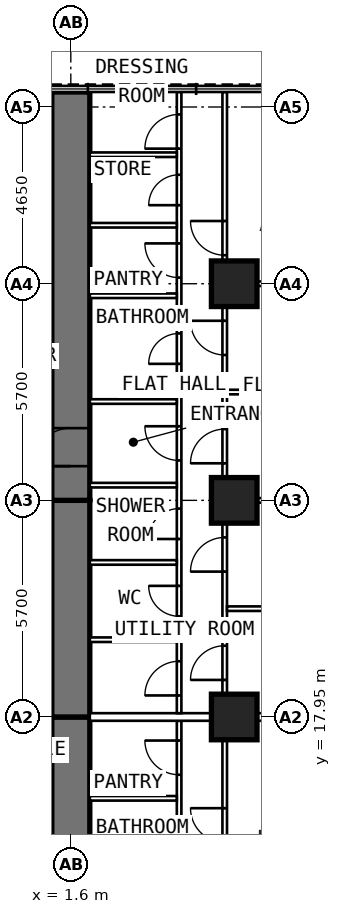
"""IFC4 building model, lengths in metres.
Left out: names, types, materials, properties, quantities, classifications, styles, units other than length and angle.
Written with IfcOpenShell. Run it as: python <this file> out.ifc"""

import sys

from ifc_helpers import new_model, si_unit, direction, frame, frame_2d, origin, origin_2d, place, context, subcontext, project, spatial, rectangle, extrude, element, fill, save


model = new_model("IFC4")
c1 = context("Model", 3, precision=1e-05, world=origin(), true_north=direction((0.0, 1.0)))
c2 = subcontext(c1, "Body", "Model", "MODEL_VIEW")
j1 = project(units=[si_unit("LENGTHUNIT", "METRE"), si_unit("PLANEANGLEUNIT", "RADIAN")], contexts=[c1])
p1 = place(None, origin())
s1 = spatial("IfcSite", under=j1, at=p1, CompositionType="ELEMENT")
p2 = place(p1, origin())
s2 = spatial("IfcBuilding", under=s1, at=p2, CompositionType="ELEMENT")
p3 = place(p2, frame((0.0, 0.0, 46.6)))
s3 = spatial("IfcBuildingStorey", under=s2, at=p3, CompositionType="ELEMENT", Elevation=46.6)
for number, where, z_axis, x_axis in (
    (1, (5.9, 17.95, 0.0), (0.0, 0.0, 1.0), (0.0, 1.0, 0.0)),
    (2, (5.9, 23.65, 0.0), (0.0, 0.0, 1.0), (0.0, 1.0, 0.0)),
    (3, (5.9, 29.35, 0.0), (0.0, 0.0, 1.0), (0.0, 1.0, 0.0)),
):
    element("IfcColumn", number, at=place(p3, frame(where, z_axis=z_axis, x_axis=x_axis)), inside=s3, PredefinedType="COLUMN", context=c2, shape_type="SweptSolid", body=[
        extrude(rectangle(XDim=1.2, YDim=1.2, at=origin_2d()), origin(), (0.0, 0.0, 1.0), 3.6),
    ])
p4 = place(p3, frame((1.6, 9.6, 0.0), z_axis=(0.0, 0.0, 1.0), x_axis=(0.0, 1.0, 0.0)))
e4 = element("IfcWall", 4, at=p4, inside=s3, PredefinedType="SHEAR", context=c2, shape_type="SweptSolid", body=[
    extrude(rectangle(XDim=8.35, YDim=1.0, at=frame_2d((4.175, 0.0))), origin(), (0.0, 0.0, 1.0), 3.6),
])
p5 = place(p4, frame((1.3, 0.0, 0.0)))
e5 = element("IfcOpeningElement", 5, at=p5, cuts=e4, PredefinedType="OPENING", context=c2, shape_type="SweptSolid", body=[
    extrude(rectangle(XDim=1.0, YDim=2.1, at=frame_2d((0.5, 1.05))), frame((0.0, 0.512, 0.0), z_axis=(0.0, -1.0, 0.0), x_axis=(1.0, 0.0, 0.0)), (0.0, 0.0, 1.0), 1.024),
])
p6 = place(p3, frame((1.6, 17.95, 0.0), z_axis=(0.0, 0.0, 1.0), x_axis=(0.0, 1.0, 0.0)))
e6 = element("IfcWall", 6, at=p6, inside=s3, PredefinedType="SHEAR", context=c2, shape_type="SweptSolid", body=[
    extrude(rectangle(XDim=5.7, YDim=1.0, at=frame_2d((2.85, 0.0))), origin(), (0.0, 0.0, 1.0), 3.6),
])
p7 = place(p3, frame((1.6, 23.65, 0.0), z_axis=(0.0, 0.0, 1.0), x_axis=(0.0, 1.0, 0.0)))
e7 = element("IfcWall", 7, at=p7, inside=s3, PredefinedType="SHEAR", context=c2, shape_type="SweptSolid", body=[
    extrude(rectangle(XDim=10.745, YDim=1.0, at=frame_2d((5.373, 0.0))), origin(), (0.0, 0.0, 1.0), 3.6),
])
p8 = place(p7, frame((0.9, 0.0, 0.0)))
e8 = element("IfcOpeningElement", 8, at=p8, cuts=e7, PredefinedType="OPENING", context=c2, shape_type="SweptSolid", body=[
    extrude(rectangle(XDim=1.0, YDim=2.1, at=frame_2d((0.5, 1.05))), frame((0.0, 0.512, 0.0), z_axis=(0.0, -1.0, 0.0), x_axis=(1.0, 0.0, 0.0)), (0.0, 0.0, 1.0), 1.024),
])
p9 = place(p3, frame((4.45, 10.1, 0.0), z_axis=(0.0, 0.0, 1.0), x_axis=(0.0, 1.0, 0.0)))
e9 = element("IfcWall", 9, at=p9, inside=s3, PredefinedType="PARTITIONING", context=c2, shape_type="SweptSolid", body=[
    extrude(rectangle(XDim=7.75, YDim=0.12, at=frame_2d((3.875, 0.0))), origin(), (0.0, 0.0, 1.0), 3.35),
])
p10 = place(p9, frame((0.75, 0.0, 0.0)))
e10 = element("IfcOpeningElement", 10, at=p10, cuts=e9, PredefinedType="OPENING", context=c2, shape_type="SweptSolid", body=[
    extrude(rectangle(XDim=0.9, YDim=2.1, at=frame_2d((0.45, 1.05))), frame((0.0, 0.072, 0.0), z_axis=(0.0, -1.0, 0.0), x_axis=(1.0, 0.0, 0.0)), (0.0, 0.0, 1.0), 0.144),
])
p11 = place(p9, frame((3.705, 0.0, 0.0)))
e11 = element("IfcOpeningElement", 11, at=p11, cuts=e9, PredefinedType="OPENING", context=c2, shape_type="SweptSolid", body=[
    extrude(rectangle(XDim=0.8, YDim=2.1, at=frame_2d((0.4, 1.05))), frame((0.0, 0.072, 0.0), z_axis=(0.0, -1.0, 0.0), x_axis=(1.0, 0.0, 0.0)), (0.0, 0.0, 1.0), 0.144),
])
p12 = place(p9, frame((6.33, 0.0, 0.0)))
e12 = element("IfcOpeningElement", 12, at=p12, cuts=e9, PredefinedType="OPENING", context=c2, shape_type="SweptSolid", body=[
    extrude(rectangle(XDim=0.9, YDim=2.1, at=frame_2d((0.45, 1.05))), frame((0.0, 0.072, 0.0), z_axis=(0.0, -1.0, 0.0), x_axis=(1.0, 0.0, 0.0)), (0.0, 0.0, 1.0), 0.144),
])
p13 = place(p3, frame((5.65, 9.6, 0.0), z_axis=(0.0, 0.0, 1.0), x_axis=(0.0, 1.0, 0.0)))
e13 = element("IfcWall", 13, at=p13, inside=s3, PredefinedType="PARTITIONING", context=c2, shape_type="SweptSolid", body=[
    extrude(rectangle(XDim=8.1, YDim=0.12, at=frame_2d((4.05, 0.0))), origin(), (0.0, 0.0, 1.0), 3.35),
])
p14 = place(p13, frame((5.05, 0.0, 0.0)))
e14 = element("IfcOpeningElement", 14, at=p14, cuts=e13, PredefinedType="OPENING", context=c2, shape_type="SweptSolid", body=[
    extrude(rectangle(XDim=0.9, YDim=2.1, at=frame_2d((0.45, 1.05))), frame((0.0, 0.072, 0.0), z_axis=(0.0, -1.0, 0.0), x_axis=(1.0, 0.0, 0.0)), (0.0, 0.0, 1.0), 0.144),
])
p15 = place(p3, frame((2.1, 15.81, 0.0), z_axis=(0.0, 0.0, 1.0), x_axis=(1.0, 0.0, 0.0)))
e15 = element("IfcWall", 15, at=p15, inside=s3, PredefinedType="PARTITIONING", context=c2, shape_type="SweptSolid", body=[
    extrude(rectangle(XDim=2.29, YDim=0.12, at=frame_2d((1.145, 0.0))), origin(), (0.0, 0.0, 1.0), 3.35),
])
p16 = place(p3, frame((4.45, 18.05, 0.0), z_axis=(0.0, 0.0, 1.0), x_axis=(0.0, 1.0, 0.0)))
e16 = element("IfcWall", 16, at=p16, inside=s3, PredefinedType="PARTITIONING", context=c2, shape_type="SweptSolid", body=[
    extrude(rectangle(XDim=16.345, YDim=0.12, at=frame_2d((8.172, 0.0))), origin(), (0.0, 0.0, 1.0), 3.35),
])
p17 = place(p16, frame((0.467, 0.0, 0.0)))
e17 = element("IfcOpeningElement", 17, at=p17, cuts=e16, PredefinedType="OPENING", context=c2, shape_type="SweptSolid", body=[
    extrude(rectangle(XDim=0.9, YDim=2.1, at=frame_2d((0.45, 1.05))), frame((0.0, 0.072, 0.0), z_axis=(0.0, -1.0, 0.0), x_axis=(1.0, 0.0, 0.0)), (0.0, 0.0, 1.0), 0.144),
])
p18 = place(p16, frame((2.55, 0.0, 0.0)))
e18 = element("IfcOpeningElement", 18, at=p18, cuts=e16, PredefinedType="OPENING", context=c2, shape_type="SweptSolid", body=[
    extrude(rectangle(XDim=0.8, YDim=2.1, at=frame_2d((0.4, 1.05))), frame((0.0, 0.072, 0.0), z_axis=(0.0, -1.0, 0.0), x_axis=(1.0, 0.0, 0.0)), (0.0, 0.0, 1.0), 0.144),
])
p19 = place(p16, frame((4.583, 0.0, 0.0)))
e19 = element("IfcOpeningElement", 19, at=p19, cuts=e16, PredefinedType="OPENING", context=c2, shape_type="SweptSolid", body=[
    extrude(rectangle(XDim=0.8, YDim=2.1, at=frame_2d((0.4, 1.05))), frame((0.0, 0.072, 0.0), z_axis=(0.0, -1.0, 0.0), x_axis=(1.0, 0.0, 0.0)), (0.0, 0.0, 1.0), 0.144),
])
p20 = place(p16, frame((6.65, 0.0, 0.0)))
e20 = element("IfcOpeningElement", 20, at=p20, cuts=e16, PredefinedType="OPENING", context=c2, shape_type="SweptSolid", body=[
    extrude(rectangle(XDim=0.9, YDim=2.1, at=frame_2d((0.45, 1.05))), frame((0.0, 0.072, 0.0), z_axis=(0.0, -1.0, 0.0), x_axis=(1.0, 0.0, 0.0)), (0.0, 0.0, 1.0), 0.144),
])
p21 = place(p16, frame((9.192, 0.0, 0.0)))
e21 = element("IfcOpeningElement", 21, at=p21, cuts=e16, PredefinedType="OPENING", context=c2, shape_type="SweptSolid", body=[
    extrude(rectangle(XDim=0.8, YDim=2.1, at=frame_2d((0.4, 1.05))), frame((0.0, 0.072, 0.0), z_axis=(0.0, -1.0, 0.0), x_axis=(1.0, 0.0, 0.0)), (0.0, 0.0, 1.0), 0.144),
])
p22 = place(p16, frame((11.461, 0.0, 0.0)))
e22 = element("IfcOpeningElement", 22, at=p22, cuts=e16, PredefinedType="OPENING", context=c2, shape_type="SweptSolid", body=[
    extrude(rectangle(XDim=0.9, YDim=2.1, at=frame_2d((0.45, 1.05))), frame((0.0, 0.072, 0.0), z_axis=(0.0, -1.0, 0.0), x_axis=(1.0, 0.0, 0.0)), (0.0, 0.0, 1.0), 0.144),
])
p23 = place(p16, frame((13.367, 0.0, 0.0)))
e23 = element("IfcOpeningElement", 23, at=p23, cuts=e16, PredefinedType="OPENING", context=c2, shape_type="SweptSolid", body=[
    extrude(rectangle(XDim=0.8, YDim=2.1, at=frame_2d((0.4, 1.05))), frame((0.0, 0.072, 0.0), z_axis=(0.0, -1.0, 0.0), x_axis=(1.0, 0.0, 0.0)), (0.0, 0.0, 1.0), 0.144),
])
p24 = place(p16, frame((14.854, 0.0, 0.0)))
e24 = element("IfcOpeningElement", 24, at=p24, cuts=e16, PredefinedType="OPENING", context=c2, shape_type="SweptSolid", body=[
    extrude(rectangle(XDim=0.9, YDim=2.1, at=frame_2d((0.45, 1.05))), frame((0.0, 0.072, 0.0), z_axis=(0.0, -1.0, 0.0), x_axis=(1.0, 0.0, 0.0)), (0.0, 0.0, 1.0), 0.144),
])
p25 = place(p3, frame((5.65, 18.05, 0.0), z_axis=(0.0, 0.0, 1.0), x_axis=(0.0, 1.0, 0.0)))
e25 = element("IfcWall", 25, at=p25, inside=s3, PredefinedType="PARTITIONING", context=c2, shape_type="SweptSolid", body=[
    extrude(rectangle(XDim=16.345, YDim=0.12, at=frame_2d((8.172, 0.0))), origin(), (0.0, 0.0, 1.0), 3.35),
])
p26 = place(p25, frame((0.875, 0.0, 0.0)))
e26 = element("IfcOpeningElement", 26, at=p26, cuts=e25, PredefinedType="OPENING", context=c2, shape_type="SweptSolid", body=[
    extrude(rectangle(XDim=0.9, YDim=2.1, at=frame_2d((0.45, 1.05))), frame((0.0, 0.072, 0.0), z_axis=(0.0, -1.0, 0.0), x_axis=(1.0, 0.0, 0.0)), (0.0, 0.0, 1.0), 0.144),
])
p27 = place(p25, frame((3.725, 0.0, 0.0)))
e27 = element("IfcOpeningElement", 27, at=p27, cuts=e25, PredefinedType="OPENING", context=c2, shape_type="SweptSolid", body=[
    extrude(rectangle(XDim=0.9, YDim=2.1, at=frame_2d((0.45, 1.05))), frame((0.0, 0.072, 0.0), z_axis=(0.0, -1.0, 0.0), x_axis=(1.0, 0.0, 0.0)), (0.0, 0.0, 1.0), 0.144),
])
p28 = place(p25, frame((6.575, 0.0, 0.0)))
e28 = element("IfcOpeningElement", 28, at=p28, cuts=e25, PredefinedType="OPENING", context=c2, shape_type="SweptSolid", body=[
    extrude(rectangle(XDim=0.9, YDim=2.1, at=frame_2d((0.45, 1.05))), frame((0.0, 0.072, 0.0), z_axis=(0.0, -1.0, 0.0), x_axis=(1.0, 0.0, 0.0)), (0.0, 0.0, 1.0), 0.144),
])
p29 = place(p25, frame((9.425, 0.0, 0.0)))
e29 = element("IfcOpeningElement", 29, at=p29, cuts=e25, PredefinedType="OPENING", context=c2, shape_type="SweptSolid", body=[
    extrude(rectangle(XDim=0.9, YDim=2.1, at=frame_2d((0.45, 1.05))), frame((0.0, 0.072, 0.0), z_axis=(0.0, -1.0, 0.0), x_axis=(1.0, 0.0, 0.0)), (0.0, 0.0, 1.0), 0.144),
])
p30 = place(p25, frame((12.05, 0.0, 0.0)))
e30 = element("IfcOpeningElement", 30, at=p30, cuts=e25, PredefinedType="OPENING", context=c2, shape_type="SweptSolid", body=[
    extrude(rectangle(XDim=0.9, YDim=2.1, at=frame_2d((0.45, 1.05))), frame((0.0, 0.072, 0.0), z_axis=(0.0, -1.0, 0.0), x_axis=(1.0, 0.0, 0.0)), (0.0, 0.0, 1.0), 0.144),
])
p31 = place(p3, frame((5.71, 20.8, 0.0), z_axis=(0.0, 0.0, 1.0), x_axis=(1.0, 0.0, 0.0)))
e31 = element("IfcWall", 31, at=p31, inside=s3, PredefinedType="PARTITIONING", context=c2, shape_type="SweptSolid", body=[
    extrude(rectangle(XDim=4.99, YDim=0.12, at=frame_2d((2.495, 0.0))), origin(), (0.0, 0.0, 1.0), 3.35),
])
p32 = place(p3, frame((5.71, 23.65, 0.0), z_axis=(0.0, 0.0, 1.0), x_axis=(1.0, 0.0, 0.0)))
e32 = element("IfcWall", 32, at=p32, inside=s3, PredefinedType="PARTITIONING", context=c2, shape_type="SweptSolid", body=[
    extrude(rectangle(XDim=4.99, YDim=0.12, at=frame_2d((2.495, 0.0))), origin(), (0.0, 0.0, 1.0), 2.45),
])
p33 = place(p3, frame((5.71, 26.5, 0.0), z_axis=(0.0, 0.0, 1.0), x_axis=(1.0, 0.0, 0.0)))
e33 = element("IfcWall", 33, at=p33, inside=s3, PredefinedType="PARTITIONING", context=c2, shape_type="SweptSolid", body=[
    extrude(rectangle(XDim=4.99, YDim=0.12, at=frame_2d((2.495, 0.0))), origin(), (0.0, 0.0, 1.0), 3.35),
])
p34 = place(p3, frame((5.71, 29.35, 0.0), z_axis=(0.0, 0.0, 1.0), x_axis=(1.0, 0.0, 0.0)))
e34 = element("IfcWall", 34, at=p34, inside=s3, PredefinedType="PARTITIONING", context=c2, shape_type="SweptSolid", body=[
    extrude(rectangle(XDim=4.99, YDim=0.12, at=frame_2d((2.495, 0.0))), origin(), (0.0, 0.0, 1.0), 2.45),
])
for number, where, z_axis, x_axis in (
    (35, (2.1, 19.983, 0.0), (0.0, 0.0, 1.0), (1.0, 0.0, 0.0)),
    (36, (2.1, 22.017, 0.0), (0.0, 0.0, 1.0), (1.0, 0.0, 0.0)),
    (37, (2.1, 24.05, 0.0), (0.0, 0.0, 1.0), (1.0, 0.0, 0.0)),
    (38, (2.1, 26.25, 0.0), (0.0, 0.0, 1.0), (1.0, 0.0, 0.0)),
):
    element("IfcWall", number, at=place(p3, frame(where, z_axis=z_axis, x_axis=x_axis)), inside=s3, PredefinedType="PARTITIONING", context=c2, shape_type="SweptSolid", body=[
        extrude(rectangle(XDim=2.29, YDim=0.12, at=frame_2d((1.145, 0.0))), origin(), (0.0, 0.0, 1.0), 3.35),
    ])
p35 = place(p3, frame((2.1, 29.033, 0.0), z_axis=(0.0, 0.0, 1.0), x_axis=(1.0, 0.0, 0.0)))
e39 = element("IfcWall", 39, at=p35, inside=s3, PredefinedType="PARTITIONING", context=c2, shape_type="SweptSolid", body=[
    extrude(rectangle(XDim=2.29, YDim=0.12, at=frame_2d((1.145, 0.0))), origin(), (0.0, 0.0, 1.0), 2.45),
])
for number, where, z_axis, x_axis in (
    (40, (2.1, 30.889, 0.0), (0.0, 0.0, 1.0), (1.0, 0.0, 0.0)),
    (41, (2.1, 32.744, 0.0), (0.0, 0.0, 1.0), (1.0, 0.0, 0.0)),
):
    element("IfcWall", number, at=place(p3, frame(where, z_axis=z_axis, x_axis=x_axis)), inside=s3, PredefinedType="PARTITIONING", context=c2, shape_type="SweptSolid", body=[
        extrude(rectangle(XDim=2.29, YDim=0.12, at=frame_2d((1.145, 0.0))), origin(), (0.0, 0.0, 1.0), 3.35),
    ])
p36 = place(p3, frame((2.1, 17.95, 0.0), z_axis=(0.0, 0.0, 1.0), x_axis=(1.0, 0.0, 0.0)))
e42 = element("IfcWall", 42, at=p36, inside=s3, PredefinedType="PARTITIONING", context=c2, shape_type="SweptSolid", body=[
    extrude(rectangle(XDim=8.6, YDim=0.2, at=frame_2d((4.3, 0.0))), origin(), (0.0, 0.0, 1.0), 2.45),
])
p37 = place(p14, origin())
e43 = element("IfcDoor", 43, at=p37, inside=s3, OperationType="SINGLE_SWING_RIGHT", PredefinedType="DOOR", context=c2, shape_type="SweptSolid", body=[
    extrude(rectangle(XDim=0.9, YDim=2.1, at=frame_2d((0.45, 1.05))), frame((0.0, 0.025, 0.0), z_axis=(0.0, -1.0, 0.0), x_axis=(1.0, 0.0, 0.0)), (0.0, 0.0, 1.0), 0.05),
])
fill(e14, e43)
p38 = place(p12, origin())
e44 = element("IfcDoor", 44, at=p38, inside=s3, OperationType="SINGLE_SWING_RIGHT", PredefinedType="DOOR", context=c2, shape_type="SweptSolid", body=[
    extrude(rectangle(XDim=0.9, YDim=2.1, at=frame_2d((0.45, 1.05))), frame((0.0, 0.025, 0.0), z_axis=(0.0, -1.0, 0.0), x_axis=(1.0, 0.0, 0.0)), (0.0, 0.0, 1.0), 0.05),
])
fill(e12, e44)
p39 = place(p8, origin())
e45 = element("IfcDoor", 45, at=p39, inside=s3, OperationType="SINGLE_SWING_LEFT", PredefinedType="DOOR", context=c2, shape_type="SweptSolid", body=[
    extrude(rectangle(XDim=1.0, YDim=2.1, at=frame_2d((0.5, 1.05))), frame((0.0, 0.25, 0.0), z_axis=(0.0, -1.0, 0.0), x_axis=(1.0, 0.0, 0.0)), (0.0, 0.0, 1.0), 0.5),
])
fill(e8, e45)
p40 = place(p26, origin())
e46 = element("IfcDoor", 46, at=p40, inside=s3, OperationType="SINGLE_SWING_LEFT", PredefinedType="DOOR", context=c2, shape_type="SweptSolid", body=[
    extrude(rectangle(XDim=0.9, YDim=2.1, at=frame_2d((0.45, 1.05))), frame((0.0, 0.025, 0.0), z_axis=(0.0, -1.0, 0.0), x_axis=(1.0, 0.0, 0.0)), (0.0, 0.0, 1.0), 0.05),
])
fill(e26, e46)
p41 = place(p27, origin())
e47 = element("IfcDoor", 47, at=p41, inside=s3, OperationType="SINGLE_SWING_LEFT", PredefinedType="DOOR", context=c2, shape_type="SweptSolid", body=[
    extrude(rectangle(XDim=0.9, YDim=2.1, at=frame_2d((0.45, 1.05))), frame((0.0, 0.025, 0.0), z_axis=(0.0, -1.0, 0.0), x_axis=(1.0, 0.0, 0.0)), (0.0, 0.0, 1.0), 0.05),
])
fill(e27, e47)
p42 = place(p28, origin())
e48 = element("IfcDoor", 48, at=p42, inside=s3, OperationType="SINGLE_SWING_LEFT", PredefinedType="DOOR", context=c2, shape_type="SweptSolid", body=[
    extrude(rectangle(XDim=0.9, YDim=2.1, at=frame_2d((0.45, 1.05))), frame((0.0, 0.025, 0.0), z_axis=(0.0, -1.0, 0.0), x_axis=(1.0, 0.0, 0.0)), (0.0, 0.0, 1.0), 0.05),
])
fill(e28, e48)
p43 = place(p29, origin())
e49 = element("IfcDoor", 49, at=p43, inside=s3, OperationType="SINGLE_SWING_RIGHT", PredefinedType="DOOR", context=c2, shape_type="SweptSolid", body=[
    extrude(rectangle(XDim=0.9, YDim=2.1, at=frame_2d((0.45, 1.05))), frame((0.0, 0.025, 0.0), z_axis=(0.0, -1.0, 0.0), x_axis=(1.0, 0.0, 0.0)), (0.0, 0.0, 1.0), 0.05),
])
fill(e29, e49)
p44 = place(p30, origin())
e50 = element("IfcDoor", 50, at=p44, inside=s3, OperationType="SINGLE_SWING_RIGHT", PredefinedType="DOOR", context=c2, shape_type="SweptSolid", body=[
    extrude(rectangle(XDim=0.9, YDim=2.1, at=frame_2d((0.45, 1.05))), frame((0.0, 0.025, 0.0), z_axis=(0.0, -1.0, 0.0), x_axis=(1.0, 0.0, 0.0)), (0.0, 0.0, 1.0), 0.05),
])
fill(e30, e50)
p45 = place(p17, origin())
e51 = element("IfcDoor", 51, at=p45, inside=s3, OperationType="SINGLE_SWING_LEFT", PredefinedType="DOOR", context=c2, shape_type="SweptSolid", body=[
    extrude(rectangle(XDim=0.9, YDim=2.1, at=frame_2d((0.45, 1.05))), frame((0.0, 0.025, 0.0), z_axis=(0.0, -1.0, 0.0), x_axis=(1.0, 0.0, 0.0)), (0.0, 0.0, 1.0), 0.05),
])
fill(e17, e51)
p46 = place(p18, origin())
e52 = element("IfcDoor", 52, at=p46, inside=s3, OperationType="SINGLE_SWING_RIGHT", PredefinedType="DOOR", context=c2, shape_type="SweptSolid", body=[
    extrude(rectangle(XDim=0.8, YDim=2.1, at=frame_2d((0.4, 1.05))), frame((0.0, 0.025, 0.0), z_axis=(0.0, -1.0, 0.0), x_axis=(1.0, 0.0, 0.0)), (0.0, 0.0, 1.0), 0.05),
])
fill(e18, e52)
p47 = place(p19, origin())
e53 = element("IfcDoor", 53, at=p47, inside=s3, OperationType="SINGLE_SWING_LEFT", PredefinedType="DOOR", context=c2, shape_type="SweptSolid", body=[
    extrude(rectangle(XDim=0.8, YDim=2.1, at=frame_2d((0.4, 1.05))), frame((0.0, 0.025, 0.0), z_axis=(0.0, -1.0, 0.0), x_axis=(1.0, 0.0, 0.0)), (0.0, 0.0, 1.0), 0.05),
])
fill(e19, e53)
p48 = place(p20, origin())
e54 = element("IfcDoor", 54, at=p48, inside=s3, OperationType="SINGLE_SWING_RIGHT", PredefinedType="DOOR", context=c2, shape_type="SweptSolid", body=[
    extrude(rectangle(XDim=0.9, YDim=2.1, at=frame_2d((0.45, 1.05))), frame((0.0, 0.025, 0.0), z_axis=(0.0, -1.0, 0.0), x_axis=(1.0, 0.0, 0.0)), (0.0, 0.0, 1.0), 0.05),
])
fill(e20, e54)
p49 = place(p21, origin())
e55 = element("IfcDoor", 55, at=p49, inside=s3, OperationType="SINGLE_SWING_LEFT", PredefinedType="DOOR", context=c2, shape_type="SweptSolid", body=[
    extrude(rectangle(XDim=0.8, YDim=2.1, at=frame_2d((0.4, 1.05))), frame((0.0, 0.025, 0.0), z_axis=(0.0, -1.0, 0.0), x_axis=(1.0, 0.0, 0.0)), (0.0, 0.0, 1.0), 0.05),
])
fill(e21, e55)
p50 = place(p22, origin())
e56 = element("IfcDoor", 56, at=p50, inside=s3, OperationType="SINGLE_SWING_RIGHT", PredefinedType="DOOR", context=c2, shape_type="SweptSolid", body=[
    extrude(rectangle(XDim=0.9, YDim=2.1, at=frame_2d((0.45, 1.05))), frame((0.0, 0.025, 0.0), z_axis=(0.0, -1.0, 0.0), x_axis=(1.0, 0.0, 0.0)), (0.0, 0.0, 1.0), 0.05),
])
fill(e22, e56)
p51 = place(p23, origin())
e57 = element("IfcDoor", 57, at=p51, inside=s3, OperationType="SINGLE_SWING_LEFT", PredefinedType="DOOR", context=c2, shape_type="SweptSolid", body=[
    extrude(rectangle(XDim=0.8, YDim=2.1, at=frame_2d((0.4, 1.05))), frame((0.0, 0.025, 0.0), z_axis=(0.0, -1.0, 0.0), x_axis=(1.0, 0.0, 0.0)), (0.0, 0.0, 1.0), 0.05),
])
fill(e23, e57)
p52 = place(p24, origin())
e58 = element("IfcDoor", 58, at=p52, inside=s3, OperationType="SINGLE_SWING_LEFT", PredefinedType="DOOR", context=c2, shape_type="SweptSolid", body=[
    extrude(rectangle(XDim=0.9, YDim=2.1, at=frame_2d((0.45, 1.05))), frame((0.0, 0.025, 0.0), z_axis=(0.0, -1.0, 0.0), x_axis=(1.0, 0.0, 0.0)), (0.0, 0.0, 1.0), 0.05),
])
fill(e24, e58)
save(model, sys.argv[1])
